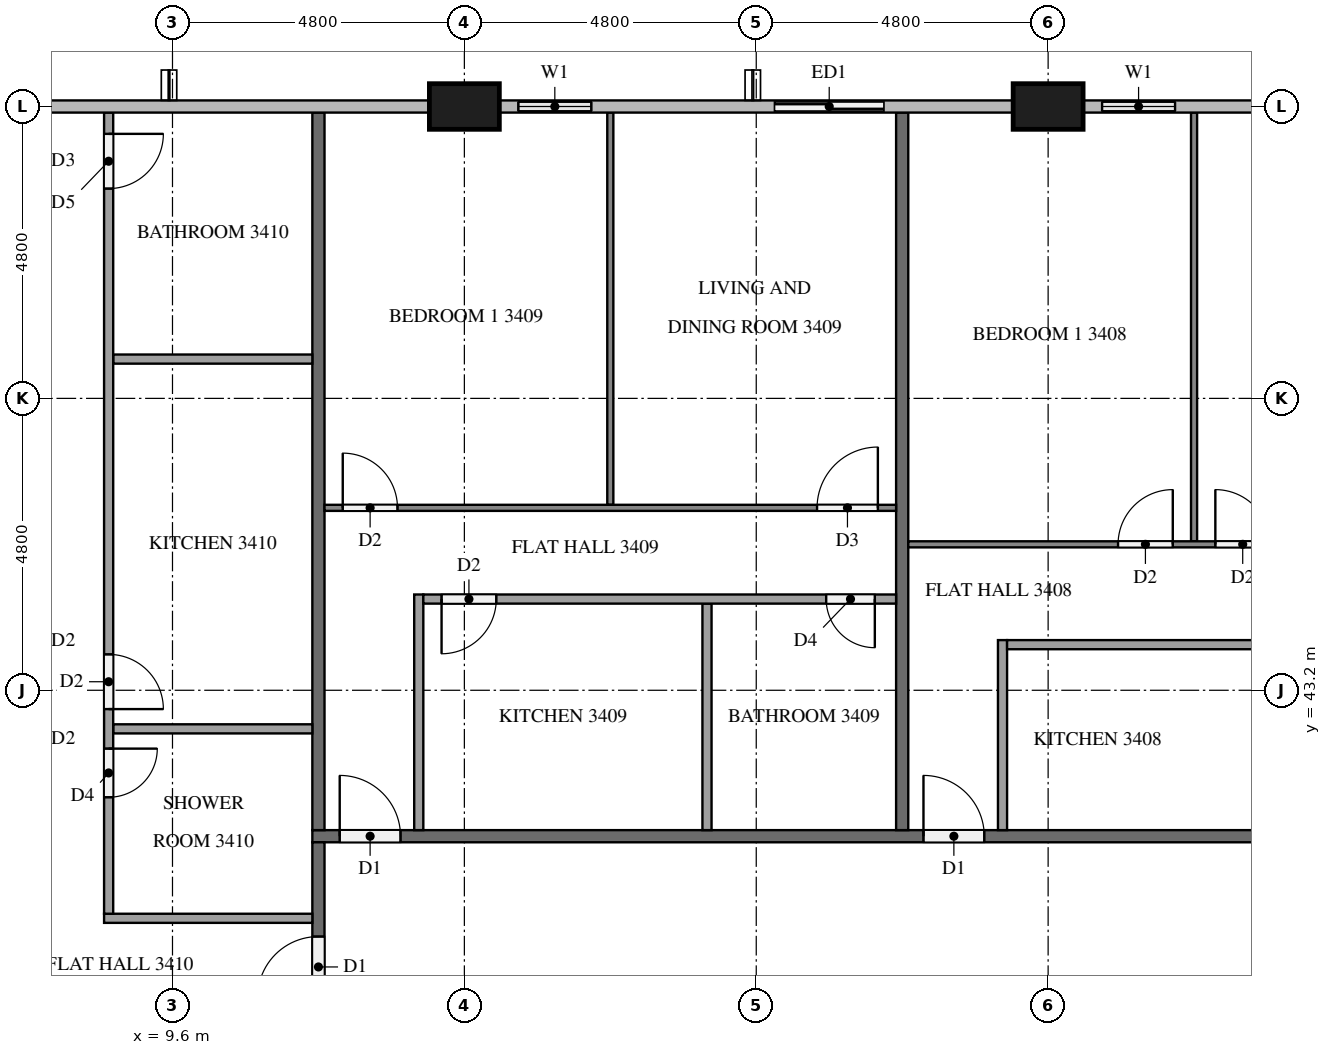
"""IFC4 building model, lengths in metres.
Left out: names, types, materials, properties, quantities, classifications, styles, units other than length and angle.
Written with IfcOpenShell. Run it as: python <this file> out.ifc"""

import sys

from ifc_helpers import new_model, si_unit, direction, frame, frame_2d, origin, origin_2d, place, context, subcontext, project, spatial, rectangle, extrude, element, fill, save


model = new_model("IFC4")
c1 = context("Model", 3, precision=1e-05, world=origin(), true_north=direction((0.0, 1.0)))
c2 = subcontext(c1, "Body", "Model", "MODEL_VIEW")
j1 = project(units=[si_unit("LENGTHUNIT", "METRE"), si_unit("PLANEANGLEUNIT", "RADIAN")], contexts=[c1])
p1 = place(None, origin())
s1 = spatial("IfcSite", under=j1, at=p1, CompositionType="ELEMENT")
p2 = place(p1, origin())
s2 = spatial("IfcBuilding", under=s1, at=p2, CompositionType="ELEMENT")
p3 = place(p2, frame((0.0, 0.0, 133.1)))
s3 = spatial("IfcBuildingStorey", under=s2, at=p3, CompositionType="ELEMENT", Elevation=133.1)
for number, where, z_axis, x_axis in (
    (1, (24.0, 52.8, 0.0), (0.0, 0.0, 1.0), (1.0, 0.0, 0.0)),
    (2, (14.4, 52.8, 0.0), (0.0, 0.0, 1.0), (1.0, 0.0, 0.0)),
):
    element("IfcColumn", number, at=place(p3, frame(where, z_axis=z_axis, x_axis=x_axis)), inside=s3, PredefinedType="COLUMN", context=c2, shape_type="SweptSolid", body=[
        extrude(rectangle(XDim=1.15, YDim=0.75, at=origin_2d()), origin(), (0.0, 0.0, 1.0), 3.2),
    ])
p4 = place(p3, frame((26.4, 52.8, 0.0), z_axis=(0.0, 0.0, 1.0), x_axis=(-1.0, 0.0, 0.0)))
e3 = element("IfcWall", 3, at=p4, inside=s3, PredefinedType="SOLIDWALL", context=c2, shape_type="SweptSolid", body=[
    extrude(rectangle(XDim=1.825, YDim=0.15, at=frame_2d((0.913, 0.0))), origin(), (0.0, 0.0, 1.0), 3.2),
])
p5 = place(p4, frame((0.312, 0.0, 0.9)))
e4 = element("IfcOpeningElement", 4, at=p5, cuts=e3, PredefinedType="OPENING", context=c2, shape_type="SweptSolid", body=[
    extrude(rectangle(XDim=1.2, YDim=1.4, at=frame_2d((0.6, 0.7))), frame((0.0, 0.085, 0.0), z_axis=(0.0, -1.0, 0.0), x_axis=(1.0, 0.0, 0.0)), (0.0, 0.0, 1.0), 0.17),
])
p6 = place(p3, frame((21.6, 52.8, 0.0), z_axis=(0.0, 0.0, 1.0), x_axis=(-1.0, 0.0, 0.0)))
e5 = element("IfcWall", 5, at=p6, inside=s3, PredefinedType="SOLIDWALL", context=c2, shape_type="SweptSolid", body=[
    extrude(rectangle(XDim=2.4, YDim=0.15, at=frame_2d((1.2, 0.0))), origin(), (0.0, 0.0, 1.0), 3.2),
])
p7 = place(p6, frame((0.3, 0.0, 0.0)))
e6 = element("IfcOpeningElement", 6, at=p7, cuts=e5, PredefinedType="OPENING", context=c2, shape_type="SweptSolid", body=[
    extrude(rectangle(XDim=1.8, YDim=2.4, at=frame_2d((0.9, 1.2))), frame((0.0, 0.085, 0.0), z_axis=(0.0, -1.0, 0.0), x_axis=(1.0, 0.0, 0.0)), (0.0, 0.0, 1.0), 0.17),
])
p8 = place(p3, frame((16.8, 52.8, 0.0), z_axis=(0.0, 0.0, 1.0), x_axis=(-1.0, 0.0, 0.0)))
e7 = element("IfcWall", 7, at=p8, inside=s3, PredefinedType="SOLIDWALL", context=c2, shape_type="SweptSolid", body=[
    extrude(rectangle(XDim=1.825, YDim=0.15, at=frame_2d((0.913, 0.0))), origin(), (0.0, 0.0, 1.0), 3.2),
])
p9 = place(p8, frame((0.312, 0.0, 0.9)))
e8 = element("IfcOpeningElement", 8, at=p9, cuts=e7, PredefinedType="OPENING", context=c2, shape_type="SweptSolid", body=[
    extrude(rectangle(XDim=1.2, YDim=1.4, at=frame_2d((0.6, 0.7))), frame((0.0, 0.085, 0.0), z_axis=(0.0, -1.0, 0.0), x_axis=(1.0, 0.0, 0.0)), (0.0, 0.0, 1.0), 0.17),
])
p10 = place(p3, frame((11.9, 40.8, 0.0), z_axis=(0.0, 0.0, 1.0), x_axis=(1.0, 0.0, 0.0)))
e9 = element("IfcWall", 9, at=p10, inside=s3, PredefinedType="PARTITIONING", context=c2, shape_type="SweptSolid", body=[
    extrude(rectangle(XDim=38.6, YDim=0.2, at=frame_2d((19.3, 0.0))), origin(), (0.0, 0.0, 1.0), 3.2),
])
p11 = place(p10, frame((37.15, 0.0, 0.0)))
e10 = element("IfcOpeningElement", 10, at=p11, cuts=e9, PredefinedType="OPENING", context=c2, shape_type="SweptSolid", body=[
    extrude(rectangle(XDim=1.0, YDim=2.1, at=frame_2d((0.5, 1.05))), frame((0.0, 0.11, 0.0), z_axis=(0.0, -1.0, 0.0), x_axis=(1.0, 0.0, 0.0)), (0.0, 0.0, 1.0), 0.22),
])
p12 = place(p10, frame((10.05, 0.0, 0.0)))
e11 = element("IfcOpeningElement", 11, at=p12, cuts=e9, PredefinedType="OPENING", context=c2, shape_type="SweptSolid", body=[
    extrude(rectangle(XDim=1.0, YDim=2.1, at=frame_2d((0.5, 1.05))), frame((0.0, 0.11, 0.0), z_axis=(0.0, -1.0, 0.0), x_axis=(1.0, 0.0, 0.0)), (0.0, 0.0, 1.0), 0.22),
])
p13 = place(p10, frame((0.45, 0.0, 0.0)))
e12 = element("IfcOpeningElement", 12, at=p13, cuts=e9, PredefinedType="OPENING", context=c2, shape_type="SweptSolid", body=[
    extrude(rectangle(XDim=1.0, YDim=2.1, at=frame_2d((0.5, 1.05))), frame((0.0, 0.11, 0.0), z_axis=(0.0, -1.0, 0.0), x_axis=(1.0, 0.0, 0.0)), (0.0, 0.0, 1.0), 0.22),
])
p14 = place(p3, frame((12.0, 37.9, 0.0), z_axis=(0.0, 0.0, 1.0), x_axis=(0.0, 1.0, 0.0)))
e13 = element("IfcWall", 13, at=p14, inside=s3, PredefinedType="PARTITIONING", context=c2, shape_type="SweptSolid", body=[
    extrude(rectangle(XDim=2.8, YDim=0.2, at=frame_2d((1.4, 0.0))), origin(), (0.0, 0.0, 1.0), 3.2),
])
p15 = place(p14, frame((0.25, 0.0, 0.0)))
e14 = element("IfcOpeningElement", 14, at=p15, cuts=e13, PredefinedType="OPENING", context=c2, shape_type="SweptSolid", body=[
    extrude(rectangle(XDim=1.0, YDim=2.1, at=frame_2d((0.5, 1.05))), frame((0.0, 0.11, 0.0), z_axis=(0.0, -1.0, 0.0), x_axis=(1.0, 0.0, 0.0)), (0.0, 0.0, 1.0), 0.22),
])
for number, where, z_axis, x_axis in (
    (15, (21.6, 52.7, 0.0), (0.0, 0.0, 1.0), (0.0, -1.0, 0.0)),
    (16, (12.0, 52.7, 0.0), (0.0, 0.0, 1.0), (0.0, -1.0, 0.0)),
):
    element("IfcWall", number, at=place(p3, frame(where, z_axis=z_axis, x_axis=x_axis)), inside=s3, PredefinedType="PARTITIONING", context=c2, shape_type="SweptSolid", body=[
        extrude(rectangle(XDim=11.8, YDim=0.2, at=frame_2d((5.9, 0.0))), origin(), (0.0, 0.0, 1.0), 3.2),
    ])
p16 = place(p3, frame((26.4, 45.65, 0.0), z_axis=(0.0, 0.0, 1.0), x_axis=(0.0, 1.0, 0.0)))
e17 = element("IfcWall", 17, at=p16, inside=s3, PredefinedType="PARTITIONING", context=c2, shape_type="SweptSolid", body=[
    extrude(rectangle(XDim=7.05, YDim=0.1, at=frame_2d((3.525, 0.0))), origin(), (0.0, 0.0, 1.0), 3.2),
])
p17 = place(p3, frame((21.7, 45.6, 0.0), z_axis=(0.0, 0.0, 1.0), x_axis=(1.0, 0.0, 0.0)))
e18 = element("IfcWall", 18, at=p17, inside=s3, PredefinedType="PARTITIONING", context=c2, shape_type="SweptSolid", body=[
    extrude(rectangle(XDim=14.2, YDim=0.1, at=frame_2d((7.1, 0.0))), origin(), (0.0, 0.0, 1.0), 3.2),
])
p18 = place(p17, frame((3.45, 0.0, 0.0)))
e19 = element("IfcOpeningElement", 19, at=p18, cuts=e18, PredefinedType="OPENING", context=c2, shape_type="SweptSolid", body=[
    extrude(rectangle(XDim=0.9, YDim=2.1, at=frame_2d((0.45, 1.05))), frame((0.0, 0.06, 0.0), z_axis=(0.0, -1.0, 0.0), x_axis=(1.0, 0.0, 0.0)), (0.0, 0.0, 1.0), 0.12),
])
p19 = place(p17, frame((5.05, 0.0, 0.0)))
e20 = element("IfcOpeningElement", 20, at=p19, cuts=e18, PredefinedType="OPENING", context=c2, shape_type="SweptSolid", body=[
    extrude(rectangle(XDim=0.9, YDim=2.1, at=frame_2d((0.45, 1.05))), frame((0.0, 0.06, 0.0), z_axis=(0.0, -1.0, 0.0), x_axis=(1.0, 0.0, 0.0)), (0.0, 0.0, 1.0), 0.12),
])
p20 = place(p17, frame((12.9, 0.0, 0.0)))
e21 = element("IfcOpeningElement", 21, at=p20, cuts=e18, PredefinedType="OPENING", context=c2, shape_type="SweptSolid", body=[
    extrude(rectangle(XDim=1.0, YDim=2.1, at=frame_2d((0.5, 1.05))), frame((0.0, 0.06, 0.0), z_axis=(0.0, -1.0, 0.0), x_axis=(1.0, 0.0, 0.0)), (0.0, 0.0, 1.0), 0.12),
])
p21 = place(p3, frame((23.25, 40.9, 0.0), z_axis=(0.0, 0.0, 1.0), x_axis=(0.0, 1.0, 0.0)))
e22 = element("IfcWall", 22, at=p21, inside=s3, PredefinedType="PARTITIONING", context=c2, shape_type="SweptSolid", body=[
    extrude(rectangle(XDim=3.125, YDim=0.15, at=frame_2d((1.562, 0.0))), origin(), (0.0, 0.0, 1.0), 3.2),
])
p22 = place(p3, frame((35.9, 43.95, 0.0), z_axis=(0.0, 0.0, 1.0), x_axis=(-1.0, 0.0, 0.0)))
e23 = element("IfcWall", 23, at=p22, inside=s3, PredefinedType="PARTITIONING", context=c2, shape_type="SweptSolid", body=[
    extrude(rectangle(XDim=12.575, YDim=0.15, at=frame_2d((6.288, 0.0))), origin(), (0.0, 0.0, 1.0), 3.2),
])
p23 = place(p22, frame((7.096, 0.0, 0.0)))
e24 = element("IfcOpeningElement", 24, at=p23, cuts=e23, PredefinedType="OPENING", context=c2, shape_type="SweptSolid", body=[
    extrude(rectangle(XDim=0.9, YDim=2.1, at=frame_2d((0.45, 1.05))), frame((0.0, 0.085, 0.0), z_axis=(0.0, -1.0, 0.0), x_axis=(1.0, 0.0, 0.0)), (0.0, 0.0, 1.0), 0.17),
])
p24 = place(p22, frame((5.546, 0.0, 0.0)))
e25 = element("IfcOpeningElement", 25, at=p24, cuts=e23, PredefinedType="OPENING", context=c2, shape_type="SweptSolid", body=[
    extrude(rectangle(XDim=0.9, YDim=2.1, at=frame_2d((0.45, 1.05))), frame((0.0, 0.085, 0.0), z_axis=(0.0, -1.0, 0.0), x_axis=(1.0, 0.0, 0.0)), (0.0, 0.0, 1.0), 0.17),
])
p25 = place(p22, frame((0.35, 0.0, 0.0)))
e26 = element("IfcOpeningElement", 26, at=p25, cuts=e23, PredefinedType="OPENING", context=c2, shape_type="SweptSolid", body=[
    extrude(rectangle(XDim=0.8, YDim=2.1, at=frame_2d((0.4, 1.05))), frame((0.0, 0.085, 0.0), z_axis=(0.0, -1.0, 0.0), x_axis=(1.0, 0.0, 0.0)), (0.0, 0.0, 1.0), 0.17),
])
p26 = place(p3, frame((16.8, 46.25, 0.0), z_axis=(0.0, 0.0, 1.0), x_axis=(0.0, 1.0, 0.0)))
e27 = element("IfcWall", 27, at=p26, inside=s3, PredefinedType="PARTITIONING", context=c2, shape_type="SweptSolid", body=[
    extrude(rectangle(XDim=6.45, YDim=0.1, at=frame_2d((3.225, 0.0))), origin(), (0.0, 0.0, 1.0), 3.2),
])
p27 = place(p3, frame((12.1, 46.2, 0.0), z_axis=(0.0, 0.0, 1.0), x_axis=(1.0, 0.0, 0.0)))
e28 = element("IfcWall", 28, at=p27, inside=s3, PredefinedType="PARTITIONING", context=c2, shape_type="SweptSolid", body=[
    extrude(rectangle(XDim=9.4, YDim=0.1, at=frame_2d((4.7, 0.0))), origin(), (0.0, 0.0, 1.0), 3.2),
])
p28 = place(p27, frame((0.3, 0.0, 0.0)))
e29 = element("IfcOpeningElement", 29, at=p28, cuts=e28, PredefinedType="OPENING", context=c2, shape_type="SweptSolid", body=[
    extrude(rectangle(XDim=0.9, YDim=2.1, at=frame_2d((0.45, 1.05))), frame((0.0, 0.06, 0.0), z_axis=(0.0, -1.0, 0.0), x_axis=(1.0, 0.0, 0.0)), (0.0, 0.0, 1.0), 0.12),
])
p29 = place(p27, frame((8.1, 0.0, 0.0)))
e30 = element("IfcOpeningElement", 30, at=p29, cuts=e28, PredefinedType="OPENING", context=c2, shape_type="SweptSolid", body=[
    extrude(rectangle(XDim=1.0, YDim=2.1, at=frame_2d((0.5, 1.05))), frame((0.0, 0.06, 0.0), z_axis=(0.0, -1.0, 0.0), x_axis=(1.0, 0.0, 0.0)), (0.0, 0.0, 1.0), 0.12),
])
p30 = place(p3, frame((18.39, 40.9, 0.0), z_axis=(0.0, 0.0, 1.0), x_axis=(0.0, 1.0, 0.0)))
e31 = element("IfcWall", 31, at=p30, inside=s3, PredefinedType="PARTITIONING", context=c2, shape_type="SweptSolid", body=[
    extrude(rectangle(XDim=3.725, YDim=0.15, at=frame_2d((1.863, 0.0))), origin(), (0.0, 0.0, 1.0), 3.2),
])
p31 = place(p3, frame((13.65, 40.9, 0.0), z_axis=(0.0, 0.0, 1.0), x_axis=(0.0, 1.0, 0.0)))
e32 = element("IfcWall", 32, at=p31, inside=s3, PredefinedType="PARTITIONING", context=c2, shape_type="SweptSolid", body=[
    extrude(rectangle(XDim=3.875, YDim=0.15, at=frame_2d((1.938, 0.0))), origin(), (0.0, 0.0, 1.0), 3.2),
])
p32 = place(p3, frame((21.5, 44.7, 0.0), z_axis=(0.0, 0.0, 1.0), x_axis=(-1.0, 0.0, 0.0)))
e33 = element("IfcWall", 33, at=p32, inside=s3, PredefinedType="PARTITIONING", context=c2, shape_type="SweptSolid", body=[
    extrude(rectangle(XDim=7.775, YDim=0.15, at=frame_2d((3.887, 0.0))), origin(), (0.0, 0.0, 1.0), 3.2),
])
p33 = place(p32, frame((6.575, 0.0, 0.0)))
e34 = element("IfcOpeningElement", 34, at=p33, cuts=e33, PredefinedType="OPENING", context=c2, shape_type="SweptSolid", body=[
    extrude(rectangle(XDim=0.9, YDim=2.1, at=frame_2d((0.45, 1.05))), frame((0.0, 0.085, 0.0), z_axis=(0.0, -1.0, 0.0), x_axis=(1.0, 0.0, 0.0)), (0.0, 0.0, 1.0), 0.17),
])
p34 = place(p32, frame((0.35, 0.0, 0.0)))
e35 = element("IfcOpeningElement", 35, at=p34, cuts=e33, PredefinedType="OPENING", context=c2, shape_type="SweptSolid", body=[
    extrude(rectangle(XDim=0.8, YDim=2.1, at=frame_2d((0.4, 1.05))), frame((0.0, 0.085, 0.0), z_axis=(0.0, -1.0, 0.0), x_axis=(1.0, 0.0, 0.0)), (0.0, 0.0, 1.0), 0.17),
])
for number, where, z_axis, x_axis in (
    (36, (11.9, 42.565, 0.0), (0.0, 0.0, 1.0), (-1.0, 0.0, 0.0)),
    (37, (11.9, 48.646, 0.0), (0.0, 0.0, 1.0), (-1.0, 0.0, 0.0)),
):
    element("IfcWall", number, at=place(p3, frame(where, z_axis=z_axis, x_axis=x_axis)), inside=s3, PredefinedType="PARTITIONING", context=c2, shape_type="SweptSolid", body=[
        extrude(rectangle(XDim=3.275, YDim=0.15, at=frame_2d((1.637, 0.0))), origin(), (0.0, 0.0, 1.0), 3.2),
    ])
p35 = place(p3, frame((11.9, 39.45, 0.0), z_axis=(0.0, 0.0, 1.0), x_axis=(-1.0, 0.0, 0.0)))
e38 = element("IfcWall", 38, at=p35, inside=s3, PredefinedType="PARTITIONING", context=c2, shape_type="SweptSolid", body=[
    extrude(rectangle(XDim=3.425, YDim=0.15, at=frame_2d((1.712, 0.0))), origin(), (0.0, 0.0, 1.0), 3.2),
])
p36 = place(p3, frame((8.55, 52.7, 0.0), z_axis=(0.0, 0.0, 1.0), x_axis=(0.0, -1.0, 0.0)))
e39 = element("IfcWall", 39, at=p36, inside=s3, PredefinedType="PARTITIONING", context=c2, shape_type="SweptSolid", body=[
    extrude(rectangle(XDim=13.175, YDim=0.15, at=frame_2d((6.587, 0.0))), origin(), (0.0, 0.0, 1.0), 3.2),
])
p37 = place(p36, frame((10.46, 0.0, 0.0)))
e40 = element("IfcOpeningElement", 40, at=p37, cuts=e39, PredefinedType="OPENING", context=c2, shape_type="SweptSolid", body=[
    extrude(rectangle(XDim=0.8, YDim=2.1, at=frame_2d((0.4, 1.05))), frame((0.0, 0.085, 0.0), z_axis=(0.0, -1.0, 0.0), x_axis=(1.0, 0.0, 0.0)), (0.0, 0.0, 1.0), 0.17),
])
p38 = place(p36, frame((8.91, 0.0, 0.0)))
e41 = element("IfcOpeningElement", 41, at=p38, cuts=e39, PredefinedType="OPENING", context=c2, shape_type="SweptSolid", body=[
    extrude(rectangle(XDim=0.9, YDim=2.1, at=frame_2d((0.45, 1.05))), frame((0.0, 0.085, 0.0), z_axis=(0.0, -1.0, 0.0), x_axis=(1.0, 0.0, 0.0)), (0.0, 0.0, 1.0), 0.17),
])
p39 = place(p36, frame((0.35, 0.0, 0.0)))
e42 = element("IfcOpeningElement", 42, at=p39, cuts=e39, PredefinedType="OPENING", context=c2, shape_type="SweptSolid", body=[
    extrude(rectangle(XDim=0.9, YDim=2.1, at=frame_2d((0.45, 1.05))), frame((0.0, 0.085, 0.0), z_axis=(0.0, -1.0, 0.0), x_axis=(1.0, 0.0, 0.0)), (0.0, 0.0, 1.0), 0.17),
])
p40 = place(p5, origin())
e43 = element("IfcWindow", 43, at=p40, inside=s3, PartitioningType="SINGLE_PANEL", PredefinedType="WINDOW", context=c2, shape_type="SweptSolid", body=[
    extrude(rectangle(XDim=1.2, YDim=1.4, at=frame_2d((0.6, 0.7))), frame((0.0, 0.03, 0.0), z_axis=(0.0, -1.0, 0.0), x_axis=(1.0, 0.0, 0.0)), (0.0, 0.0, 1.0), 0.06),
])
fill(e4, e43)
p41 = place(p7, origin())
e44 = element("IfcDoor", 44, at=p41, inside=s3, OperationType="SLIDING_TO_RIGHT", PredefinedType="DOOR", context=c2, shape_type="SweptSolid", body=[
    extrude(rectangle(XDim=1.8, YDim=2.4, at=frame_2d((0.9, 1.2))), frame((0.0, 0.025, 0.0), z_axis=(0.0, -1.0, 0.0), x_axis=(1.0, 0.0, 0.0)), (0.0, 0.0, 1.0), 0.05),
])
fill(e6, e44)
p42 = place(p9, origin())
e45 = element("IfcWindow", 45, at=p42, inside=s3, PartitioningType="SINGLE_PANEL", PredefinedType="WINDOW", context=c2, shape_type="SweptSolid", body=[
    extrude(rectangle(XDim=1.2, YDim=1.4, at=frame_2d((0.6, 0.7))), frame((0.0, 0.03, 0.0), z_axis=(0.0, -1.0, 0.0), x_axis=(1.0, 0.0, 0.0)), (0.0, 0.0, 1.0), 0.06),
])
fill(e8, e45)
p43 = place(p12, origin())
e46 = element("IfcDoor", 46, at=p43, inside=s3, OperationType="SINGLE_SWING_LEFT", PredefinedType="DOOR", context=c2, shape_type="SweptSolid", body=[
    extrude(rectangle(XDim=1.0, YDim=2.1, at=frame_2d((0.5, 1.05))), frame((0.0, 0.025, 0.0), z_axis=(0.0, -1.0, 0.0), x_axis=(1.0, 0.0, 0.0)), (0.0, 0.0, 1.0), 0.05),
])
fill(e11, e46)
p44 = place(p13, origin())
e47 = element("IfcDoor", 47, at=p44, inside=s3, OperationType="SINGLE_SWING_LEFT", PredefinedType="DOOR", context=c2, shape_type="SweptSolid", body=[
    extrude(rectangle(XDim=1.0, YDim=2.1, at=frame_2d((0.5, 1.05))), frame((0.0, 0.025, 0.0), z_axis=(0.0, -1.0, 0.0), x_axis=(1.0, 0.0, 0.0)), (0.0, 0.0, 1.0), 0.05),
])
fill(e12, e47)
p45 = place(p15, origin())
e48 = element("IfcDoor", 48, at=p45, inside=s3, OperationType="SINGLE_SWING_LEFT", PredefinedType="DOOR", context=c2, shape_type="SweptSolid", body=[
    extrude(rectangle(XDim=1.0, YDim=2.1, at=frame_2d((0.5, 1.05))), frame((0.0, 0.025, 0.0), z_axis=(0.0, -1.0, 0.0), x_axis=(1.0, 0.0, 0.0)), (0.0, 0.0, 1.0), 0.05),
])
fill(e14, e48)
p46 = place(p18, origin())
e49 = element("IfcDoor", 49, at=p46, inside=s3, OperationType="SINGLE_SWING_RIGHT", PredefinedType="DOOR", context=c2, shape_type="SweptSolid", body=[
    extrude(rectangle(XDim=0.9, YDim=2.1, at=frame_2d((0.45, 1.05))), frame((0.0, 0.025, 0.0), z_axis=(0.0, -1.0, 0.0), x_axis=(1.0, 0.0, 0.0)), (0.0, 0.0, 1.0), 0.05),
])
fill(e19, e49)
p47 = place(p19, origin())
e50 = element("IfcDoor", 50, at=p47, inside=s3, OperationType="SINGLE_SWING_LEFT", PredefinedType="DOOR", context=c2, shape_type="SweptSolid", body=[
    extrude(rectangle(XDim=0.9, YDim=2.1, at=frame_2d((0.45, 1.05))), frame((0.0, 0.025, 0.0), z_axis=(0.0, -1.0, 0.0), x_axis=(1.0, 0.0, 0.0)), (0.0, 0.0, 1.0), 0.05),
])
fill(e20, e50)
p48 = place(p28, origin())
e51 = element("IfcDoor", 51, at=p48, inside=s3, OperationType="SINGLE_SWING_LEFT", PredefinedType="DOOR", context=c2, shape_type="SweptSolid", body=[
    extrude(rectangle(XDim=0.9, YDim=2.1, at=frame_2d((0.45, 1.05))), frame((0.0, 0.025, 0.0), z_axis=(0.0, -1.0, 0.0), x_axis=(1.0, 0.0, 0.0)), (0.0, 0.0, 1.0), 0.05),
])
fill(e29, e51)
p49 = place(p29, origin())
e52 = element("IfcDoor", 52, at=p49, inside=s3, OperationType="SINGLE_SWING_RIGHT", PredefinedType="DOOR", context=c2, shape_type="SweptSolid", body=[
    extrude(rectangle(XDim=1.0, YDim=2.1, at=frame_2d((0.5, 1.05))), frame((0.0, 0.025, 0.0), z_axis=(0.0, -1.0, 0.0), x_axis=(1.0, 0.0, 0.0)), (0.0, 0.0, 1.0), 0.05),
])
fill(e30, e52)
p50 = place(p33, origin())
e53 = element("IfcDoor", 53, at=p50, inside=s3, OperationType="SINGLE_SWING_RIGHT", PredefinedType="DOOR", context=c2, shape_type="SweptSolid", body=[
    extrude(rectangle(XDim=0.9, YDim=2.1, at=frame_2d((0.45, 1.05))), frame((0.0, 0.025, 0.0), z_axis=(0.0, -1.0, 0.0), x_axis=(1.0, 0.0, 0.0)), (0.0, 0.0, 1.0), 0.05),
])
fill(e34, e53)
p51 = place(p34, origin())
e54 = element("IfcDoor", 54, at=p51, inside=s3, OperationType="SINGLE_SWING_LEFT", PredefinedType="DOOR", context=c2, shape_type="SweptSolid", body=[
    extrude(rectangle(XDim=0.8, YDim=2.1, at=frame_2d((0.4, 1.05))), frame((0.0, 0.025, 0.0), z_axis=(0.0, -1.0, 0.0), x_axis=(1.0, 0.0, 0.0)), (0.0, 0.0, 1.0), 0.05),
])
fill(e35, e54)
p52 = place(p37, origin())
e55 = element("IfcDoor", 55, at=p52, inside=s3, OperationType="SINGLE_SWING_LEFT", PredefinedType="DOOR", context=c2, shape_type="SweptSolid", body=[
    extrude(rectangle(XDim=0.8, YDim=2.1, at=frame_2d((0.4, 1.05))), frame((0.0, 0.025, 0.0), z_axis=(0.0, -1.0, 0.0), x_axis=(1.0, 0.0, 0.0)), (0.0, 0.0, 1.0), 0.05),
])
fill(e40, e55)
p53 = place(p38, origin())
e56 = element("IfcDoor", 56, at=p53, inside=s3, OperationType="SINGLE_SWING_RIGHT", PredefinedType="DOOR", context=c2, shape_type="SweptSolid", body=[
    extrude(rectangle(XDim=0.9, YDim=2.1, at=frame_2d((0.45, 1.05))), frame((0.0, 0.025, 0.0), z_axis=(0.0, -1.0, 0.0), x_axis=(1.0, 0.0, 0.0)), (0.0, 0.0, 1.0), 0.05),
])
fill(e41, e56)
p54 = place(p39, origin())
e57 = element("IfcDoor", 57, at=p54, inside=s3, OperationType="SINGLE_SWING_LEFT", PredefinedType="DOOR", context=c2, shape_type="SweptSolid", body=[
    extrude(rectangle(XDim=0.9, YDim=2.1, at=frame_2d((0.45, 1.05))), frame((0.0, 0.025, 0.0), z_axis=(0.0, -1.0, 0.0), x_axis=(1.0, 0.0, 0.0)), (0.0, 0.0, 1.0), 0.05),
])
fill(e42, e57)
save(model, sys.argv[1])
